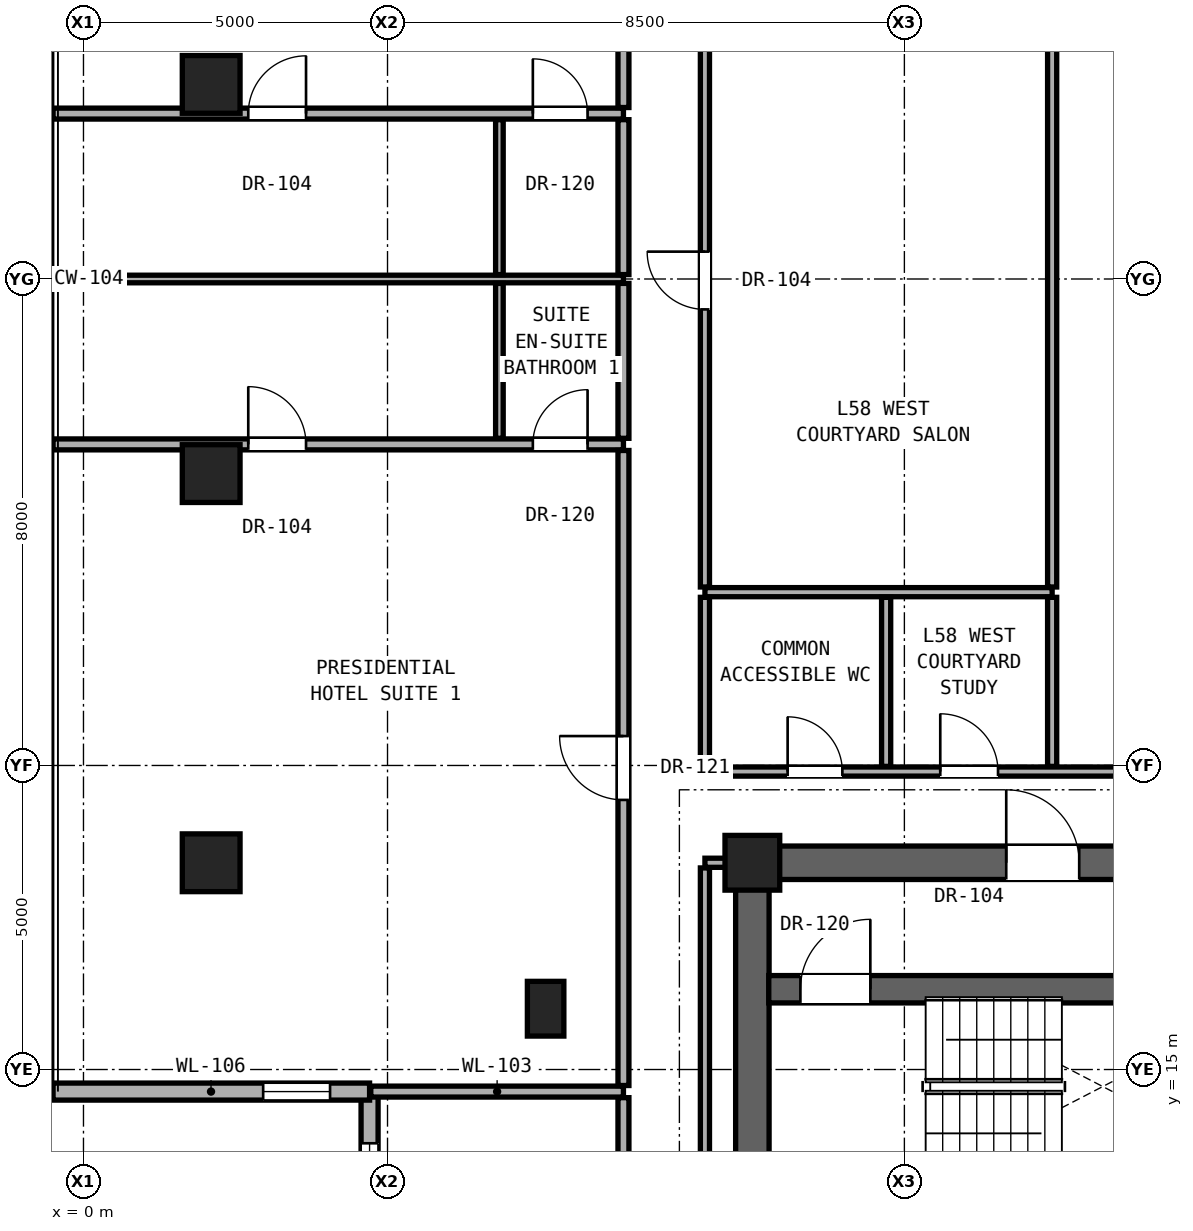
"""IFC4 building model, lengths in metres.
Left out: names, types, materials, properties, quantities, classifications, styles, units other than length and angle.
Written with IfcOpenShell. Run it as: python <this file> out.ifc"""

import sys

from ifc_helpers import new_model, si_unit, direction, frame, frame_2d, origin, origin_2d, place, context, subcontext, project, spatial, rectangle, hollow_rectangle, extrude, element, fill, save


model = new_model("IFC4")
c1 = context("Model", 3, precision=1e-05, world=origin(), true_north=direction((0.0, 1.0)))
c2 = subcontext(c1, "Body", "Model", "MODEL_VIEW")
j1 = project(units=[si_unit("LENGTHUNIT", "METRE"), si_unit("PLANEANGLEUNIT", "RADIAN")], contexts=[c1])
p1 = place(None, origin())
s1 = spatial("IfcSite", under=j1, at=p1, CompositionType="ELEMENT")
p2 = place(p1, origin())
s2 = spatial("IfcBuilding", under=s1, at=p2, CompositionType="ELEMENT")
p3 = place(p2, frame((0.0, 0.0, 203.15)))
s3 = spatial("IfcBuildingStorey", under=s2, at=p3, CompositionType="ELEMENT", Elevation=203.15)
p4 = place(p3, frame((11.0, 18.4, 0.0), z_axis=(0.0, 0.0, 1.0), x_axis=(1.0, 0.0, 0.0)))
e1 = element("IfcColumn", 1, at=p4, inside=s3, PredefinedType="COLUMN", context=c2, shape_type="SweptSolid", body=[
    extrude(rectangle(XDim=0.9, YDim=0.9, at=origin_2d()), origin(), (0.0, 0.0, 1.0), 3.25),
])
for number, where, z_axis, x_axis in (
    (2, (2.1, 18.4, 0.0), (0.0, 0.0, 1.0), (1.0, 0.0, 0.0)),
    (3, (2.1, 24.8, 0.0), (0.0, 0.0, 1.0), (1.0, 0.0, 0.0)),
    (4, (2.1, 31.2, 0.0), (0.0, 0.0, 1.0), (1.0, 0.0, 0.0)),
):
    element("IfcColumn", number, at=place(p3, frame(where, z_axis=z_axis, x_axis=x_axis)), inside=s3, PredefinedType="COLUMN", context=c2, shape_type="SweptSolid", body=[
        extrude(hollow_rectangle(XDim=0.95, YDim=0.95, WallThickness=0.05, at=origin_2d()), origin(), (0.0, 0.0, 1.0), 3.25),
    ])
p5 = place(p3, frame((7.6, 16.0, 0.0), z_axis=(0.0, 0.0, 1.0), x_axis=(1.0, 0.0, 0.0)))
e5 = element("IfcColumn", 5, at=p5, inside=s3, PredefinedType="PILASTER", context=c2, shape_type="SweptSolid", body=[
    extrude(rectangle(XDim=0.6, YDim=0.9, at=origin_2d()), origin(), (0.0, 0.0, 1.0), 3.25),
])
p6 = place(p3, frame((11.0, 12.4, 0.0), z_axis=(0.0, 0.0, 1.0), x_axis=(0.0, 1.0, 0.0)))
e6 = element("IfcWall", 6, at=p6, inside=s3, PredefinedType="SHEAR", context=c2, shape_type="SweptSolid", body=[
    extrude(rectangle(XDim=6.0, YDim=0.55, at=frame_2d((3.0, 0.0))), origin(), (0.0, 0.0, 1.0), 3.05),
])
p7 = place(p3, frame((11.0, 18.4, 0.0), z_axis=(0.0, 0.0, 1.0), x_axis=(1.0, 0.0, 0.0)))
e7 = element("IfcWall", 7, at=p7, inside=s3, PredefinedType="SHEAR", context=c2, shape_type="SweptSolid", body=[
    extrude(rectangle(XDim=19.0, YDim=0.55, at=frame_2d((9.5, 0.0))), origin(), (0.0, 0.0, 1.0), 3.05),
])
p8 = place(p7, frame((4.175, 0.0, 0.0)))
e8 = element("IfcOpeningElement", 8, at=p8, cuts=e7, PredefinedType="OPENING", context=c2, shape_type="SweptSolid", body=[
    extrude(rectangle(XDim=1.2, YDim=2.25, at=frame_2d((0.6, 1.125))), frame((0.0, 0.285, 0.0), z_axis=(0.0, -1.0, 0.0), x_axis=(1.0, 0.0, 0.0)), (0.0, 0.0, 1.0), 0.57),
])
p9 = place(p7, frame((11.075, 0.0, 0.0)))
e9 = element("IfcOpeningElement", 9, at=p9, cuts=e7, PredefinedType="OPENING", context=c2, shape_type="SweptSolid", body=[
    extrude(rectangle(XDim=0.95, YDim=2.15, at=frame_2d((0.475, 1.075))), frame((0.0, 0.285, 0.0), z_axis=(0.0, -1.0, 0.0), x_axis=(1.0, 0.0, 0.0)), (0.0, 0.0, 1.0), 0.57),
])
p10 = place(p7, frame((14.3, 0.0, 0.0)))
e10 = element("IfcOpeningElement", 10, at=p10, cuts=e7, PredefinedType="OPENING", context=c2, shape_type="SweptSolid", body=[
    extrude(rectangle(XDim=1.3, YDim=2.3, at=frame_2d((0.65, 1.15))), frame((0.0, 0.285, 0.0), z_axis=(0.0, -1.0, 0.0), x_axis=(1.0, 0.0, 0.0)), (0.0, 0.0, 1.0), 0.57),
])
p11 = place(p7, frame((16.6, 0.0, 0.0)))
e11 = element("IfcOpeningElement", 11, at=p11, cuts=e7, PredefinedType="OPENING", context=c2, shape_type="SweptSolid", body=[
    extrude(rectangle(XDim=1.3, YDim=2.3, at=frame_2d((0.65, 1.15))), frame((0.0, 0.285, 0.0), z_axis=(0.0, -1.0, 0.0), x_axis=(1.0, 0.0, 0.0)), (0.0, 0.0, 1.0), 0.57),
])
p12 = place(p3, frame((4.705, 14.637, 0.0), z_axis=(0.0, 0.0, 1.0), x_axis=(0.0, -1.0, 0.0)))
e12 = element("IfcWall", 12, at=p12, inside=s3, PredefinedType="SOLIDWALL", context=c2, shape_type="SweptSolid", body=[
    extrude(rectangle(XDim=5.215, YDim=0.28, at=frame_2d((2.607, 0.0))), origin(), (0.0, 0.0, 1.0), 3.03),
])
p13 = place(p12, frame((0.85, 0.0, 0.68)))
e13 = element("IfcOpeningElement", 13, at=p13, cuts=e12, PredefinedType="OPENING", context=c2, shape_type="SweptSolid", body=[
    extrude(rectangle(XDim=1.35, YDim=2.2, at=frame_2d((0.675, 1.1))), frame((0.0, 0.15, 0.0), z_axis=(0.0, -1.0, 0.0), x_axis=(1.0, 0.0, 0.0)), (0.0, 0.0, 1.0), 0.3),
])
p14 = place(p3, frame((-0.51, 14.637, 0.0), z_axis=(0.0, 0.0, 1.0), x_axis=(1.0, 0.0, 0.0)))
e14 = element("IfcWall", 14, at=p14, inside=s3, PredefinedType="SOLIDWALL", context=c2, shape_type="SweptSolid", body=[
    extrude(rectangle(XDim=5.215, YDim=0.28, at=frame_2d((2.607, 0.0))), origin(), (0.0, 0.0, 1.0), 3.03),
])
p15 = place(p14, frame((3.465, 0.0, 0.85)))
e15 = element("IfcOpeningElement", 15, at=p15, cuts=e14, PredefinedType="OPENING", context=c2, shape_type="SweptSolid", body=[
    extrude(rectangle(XDim=1.1, YDim=2.0, at=frame_2d((0.55, 1.0))), frame((0.0, 0.15, 0.0), z_axis=(0.0, -1.0, 0.0), x_axis=(1.0, 0.0, 0.0)), (0.0, 0.0, 1.0), 0.3),
])
p16 = place(p3, frame((4.725, 14.637, 0.0), z_axis=(0.0, 0.0, 1.0), x_axis=(1.0, 0.0, 0.0)))
e16 = element("IfcWall", 16, at=p16, inside=s3, PredefinedType="PARTITIONING", context=c2, shape_type="SweptSolid", body=[
    extrude(rectangle(XDim=4.155, YDim=0.18, at=frame_2d((2.077, 0.0))), origin(), (0.0, 0.0, 1.0), 3.05),
])
p17 = place(p3, frame((11.27, 16.32, 0.0), z_axis=(0.0, 0.0, 1.0), x_axis=(1.0, 0.0, 0.0)))
e17 = element("IfcWall", 17, at=p17, inside=s3, PredefinedType="SHEAR", context=c2, shape_type="SweptSolid", body=[
    extrude(rectangle(XDim=9.01, YDim=0.45, at=frame_2d((4.505, 0.0))), origin(), (0.0, 0.0, 1.0), 3.05),
])
p18 = place(p17, frame((0.52, 0.0, 0.0)))
e18 = element("IfcOpeningElement", 18, at=p18, cuts=e17, PredefinedType="OPENING", context=c2, shape_type="SweptSolid", body=[
    extrude(rectangle(XDim=1.15, YDim=2.2, at=frame_2d((0.575, 1.1))), frame((0.0, 0.235, 0.0), z_axis=(0.0, -1.0, 0.0), x_axis=(1.0, 0.0, 0.0)), (0.0, 0.0, 1.0), 0.47),
])
p19 = place(p3, frame((10.22, 18.4, 0.0), z_axis=(0.0, 0.0, 1.0), x_axis=(1.0, 0.0, 0.0)))
e19 = element("IfcWall", 19, at=p19, inside=s3, PredefinedType="PARTITIONING", context=c2, shape_type="SweptSolid", body=[
    extrude(rectangle(XDim=0.51, YDim=0.15, at=frame_2d((0.255, 0.0))), origin(), (0.0, 0.0, 1.0), 2.442),
])
p20 = place(p3, frame((10.22, 19.9, 0.0), z_axis=(0.0, 0.0, 1.0), x_axis=(1.0, 0.0, 0.0)))
e20 = element("IfcWall", 20, at=p20, inside=s3, PredefinedType="PARTITIONING", context=c2, shape_type="SweptSolid", body=[
    extrude(rectangle(XDim=20.56, YDim=0.15, at=frame_2d((10.28, 0.0))), origin(), (0.0, 0.0, 1.0), 2.186),
])
p21 = place(p20, frame((1.36, 0.0, 0.0)))
e21 = element("IfcOpeningElement", 21, at=p21, cuts=e20, PredefinedType="OPENING", context=c2, shape_type="SweptSolid", body=[
    extrude(rectangle(XDim=0.9, YDim=2.1, at=frame_2d((0.45, 1.05))), frame((0.0, 0.085, 0.0), z_axis=(0.0, -1.0, 0.0), x_axis=(1.0, 0.0, 0.0)), (0.0, 0.0, 1.0), 0.17),
])
p22 = place(p20, frame((3.87, 0.0, 0.0)))
e22 = element("IfcOpeningElement", 22, at=p22, cuts=e20, PredefinedType="OPENING", context=c2, shape_type="SweptSolid", body=[
    extrude(rectangle(XDim=0.95, YDim=2.15, at=frame_2d((0.475, 1.075))), frame((0.0, 0.085, 0.0), z_axis=(0.0, -1.0, 0.0), x_axis=(1.0, 0.0, 0.0)), (0.0, 0.0, 1.0), 0.17),
])
p23 = place(p20, frame((7.661, 0.0, 0.0)))
e23 = element("IfcOpeningElement", 23, at=p23, cuts=e20, PredefinedType="OPENING", context=c2, shape_type="SweptSolid", body=[
    extrude(rectangle(XDim=0.85, YDim=2.01, at=frame_2d((0.425, 1.005))), frame((0.0, 0.085, 0.0), z_axis=(0.0, -1.0, 0.0), x_axis=(1.0, 0.0, 0.0)), (0.0, 0.0, 1.0), 0.17),
])
p24 = place(p3, frame((10.22, 22.85, 0.0), z_axis=(0.0, 0.0, 1.0), x_axis=(1.0, 0.0, 0.0)))
e24 = element("IfcWall", 24, at=p24, inside=s3, PredefinedType="PARTITIONING", context=c2, shape_type="SweptSolid", body=[
    extrude(rectangle(XDim=5.71, YDim=0.15, at=frame_2d((2.855, 0.0))), origin(), (0.0, 0.0, 1.0), 2.186),
])
p25 = place(p3, frame((-0.51, 25.28, 0.0), z_axis=(0.0, 0.0, 1.0), x_axis=(1.0, 0.0, 0.0)))
e25 = element("IfcWall", 25, at=p25, inside=s3, PredefinedType="PARTITIONING", context=c2, shape_type="SweptSolid", body=[
    extrude(rectangle(XDim=9.39, YDim=0.18, at=frame_2d((4.695, 0.0))), origin(), (0.0, 0.0, 1.0), 2.269),
])
p26 = place(p25, frame((3.22, 0.0, 0.0)))
e26 = element("IfcOpeningElement", 26, at=p26, cuts=e25, PredefinedType="OPENING", context=c2, shape_type="SweptSolid", body=[
    extrude(rectangle(XDim=0.95, YDim=2.15, at=frame_2d((0.475, 1.075))), frame((0.0, 0.1, 0.0), z_axis=(0.0, -1.0, 0.0), x_axis=(1.0, 0.0, 0.0)), (0.0, 0.0, 1.0), 0.2),
])
p27 = place(p25, frame((7.9, 0.0, 0.0)))
e27 = element("IfcOpeningElement", 27, at=p27, cuts=e25, PredefinedType="OPENING", context=c2, shape_type="SweptSolid", body=[
    extrude(rectangle(XDim=0.9, YDim=2.1, at=frame_2d((0.45, 1.05))), frame((0.0, 0.1, 0.0), z_axis=(0.0, -1.0, 0.0), x_axis=(1.0, 0.0, 0.0)), (0.0, 0.0, 1.0), 0.2),
])
p28 = place(p3, frame((-0.51, 28.0, 0.0), z_axis=(0.0, 0.0, 1.0), x_axis=(1.0, 0.0, 0.0)))
e28 = element("IfcWall", 28, at=p28, inside=s3, PredefinedType="PARTITIONING", context=c2, shape_type="SweptSolid", body=[
    extrude(rectangle(XDim=9.39, YDim=0.125, at=frame_2d((4.695, 0.0))), origin(), (0.0, 0.0, 1.0), 2.269),
])
p29 = place(p3, frame((-0.51, 30.72, 0.0), z_axis=(0.0, 0.0, 1.0), x_axis=(1.0, 0.0, 0.0)))
e29 = element("IfcWall", 29, at=p29, inside=s3, PredefinedType="PARTITIONING", context=c2, shape_type="SweptSolid", body=[
    extrude(rectangle(XDim=9.39, YDim=0.18, at=frame_2d((4.695, 0.0))), origin(), (0.0, 0.0, 1.0), 2.269),
])
p30 = place(p29, frame((3.22, 0.0, 0.0)))
e30 = element("IfcOpeningElement", 30, at=p30, cuts=e29, PredefinedType="OPENING", context=c2, shape_type="SweptSolid", body=[
    extrude(rectangle(XDim=0.95, YDim=2.15, at=frame_2d((0.475, 1.075))), frame((0.0, 0.1, 0.0), z_axis=(0.0, -1.0, 0.0), x_axis=(1.0, 0.0, 0.0)), (0.0, 0.0, 1.0), 0.2),
])
p31 = place(p29, frame((7.9, 0.0, 0.0)))
e31 = element("IfcOpeningElement", 31, at=p31, cuts=e29, PredefinedType="OPENING", context=c2, shape_type="SweptSolid", body=[
    extrude(rectangle(XDim=0.9, YDim=2.1, at=frame_2d((0.45, 1.05))), frame((0.0, 0.1, 0.0), z_axis=(0.0, -1.0, 0.0), x_axis=(1.0, 0.0, 0.0)), (0.0, 0.0, 1.0), 0.2),
])
for number, where, z_axis, x_axis in (
    (32, (6.84, 25.38, 0.0), (0.0, 0.0, 1.0), (0.0, 1.0, 0.0)),
    (33, (6.84, 28.073, 0.0), (0.0, 0.0, 1.0), (0.0, 1.0, 0.0)),
):
    element("IfcWall", number, at=place(p3, frame(where, z_axis=z_axis, x_axis=x_axis)), inside=s3, PredefinedType="PARTITIONING", context=c2, shape_type="SweptSolid", body=[
        extrude(rectangle(XDim=2.548, YDim=0.125, at=frame_2d((1.274, 0.0))), origin(), (0.0, 0.0, 1.0), 3.05),
    ])
p32 = place(p3, frame((8.88, 9.422, 0.0), z_axis=(0.0, 0.0, 1.0), x_axis=(0.0, 1.0, 0.0)))
e34 = element("IfcWall", 34, at=p32, inside=s3, PredefinedType="PARTITIONING", context=c2, shape_type="SweptSolid", body=[
    extrude(rectangle(XDim=5.115, YDim=0.18, at=frame_2d((2.558, 0.0))), origin(), (0.0, 0.0, 1.0), 3.05),
])
p33 = place(p32, frame((2.083, 0.0, 0.0)))
e35 = element("IfcOpeningElement", 35, at=p33, cuts=e34, PredefinedType="OPENING", context=c2, shape_type="SweptSolid", body=[
    extrude(rectangle(XDim=0.95, YDim=2.15, at=frame_2d((0.475, 1.075))), frame((0.0, 0.1, 0.0), z_axis=(0.0, -1.0, 0.0), x_axis=(1.0, 0.0, 0.0)), (0.0, 0.0, 1.0), 0.2),
])
p34 = place(p3, frame((8.88, 14.737, 0.0), z_axis=(0.0, 0.0, 1.0), x_axis=(0.0, 1.0, 0.0)))
e36 = element("IfcWall", 36, at=p34, inside=s3, PredefinedType="PARTITIONING", context=c2, shape_type="SweptSolid", body=[
    extrude(rectangle(XDim=10.443, YDim=0.18, at=frame_2d((5.221, 0.0))), origin(), (0.0, 0.0, 1.0), 2.346),
])
p35 = place(p34, frame((4.697, 0.0, 0.0)))
e37 = element("IfcOpeningElement", 37, at=p35, cuts=e36, PredefinedType="OPENING", context=c2, shape_type="SweptSolid", body=[
    extrude(rectangle(XDim=1.05, YDim=2.2, at=frame_2d((0.525, 1.1))), frame((0.0, 0.1, 0.0), z_axis=(0.0, -1.0, 0.0), x_axis=(1.0, 0.0, 0.0)), (0.0, 0.0, 1.0), 0.2),
])
for number, where, z_axis, x_axis in (
    (38, (8.88, 25.38, 0.0), (0.0, 0.0, 1.0), (0.0, 1.0, 0.0)),
    (39, (8.88, 28.073, 0.0), (0.0, 0.0, 1.0), (0.0, 1.0, 0.0)),
):
    element("IfcWall", number, at=place(p3, frame(where, z_axis=z_axis, x_axis=x_axis)), inside=s3, PredefinedType="PARTITIONING", context=c2, shape_type="SweptSolid", body=[
        extrude(rectangle(XDim=2.548, YDim=0.18, at=frame_2d((1.274, 0.0))), origin(), (0.0, 0.0, 1.0), 3.05),
    ])
p36 = place(p3, frame((8.88, 30.82, 0.0), z_axis=(0.0, 0.0, 1.0), x_axis=(0.0, 1.0, 0.0)))
e40 = element("IfcWall", 40, at=p36, inside=s3, PredefinedType="PARTITIONING", context=c2, shape_type="SweptSolid", body=[
    extrude(rectangle(XDim=10.443, YDim=0.18, at=frame_2d((5.221, 0.0))), origin(), (0.0, 0.0, 1.0), 2.346),
])
p37 = place(p36, frame((4.697, 0.0, 0.0)))
e41 = element("IfcOpeningElement", 41, at=p37, cuts=e40, PredefinedType="OPENING", context=c2, shape_type="SweptSolid", body=[
    extrude(rectangle(XDim=1.05, YDim=2.2, at=frame_2d((0.525, 1.1))), frame((0.0, 0.1, 0.0), z_axis=(0.0, -1.0, 0.0), x_axis=(1.0, 0.0, 0.0)), (0.0, 0.0, 1.0), 0.2),
])
p38 = place(p3, frame((10.22, 12.335, 0.0), z_axis=(0.0, 0.0, 1.0), x_axis=(0.0, 1.0, 0.0)))
e42 = element("IfcWall", 42, at=p38, inside=s3, PredefinedType="PARTITIONING", context=c2, shape_type="SweptSolid", body=[
    extrude(rectangle(XDim=5.98, YDim=0.15, at=frame_2d((2.99, 0.0))), origin(), (0.0, 0.0, 1.0), 2.442),
])
p39 = place(p3, frame((10.22, 19.985, 0.0), z_axis=(0.0, 0.0, 1.0), x_axis=(0.0, 1.0, 0.0)))
e43 = element("IfcWall", 43, at=p39, inside=s3, PredefinedType="PARTITIONING", context=c2, shape_type="SweptSolid", body=[
    extrude(rectangle(XDim=2.78, YDim=0.15, at=frame_2d((1.39, 0.0))), origin(), (0.0, 0.0, 1.0), 3.05),
])
p40 = place(p3, frame((10.22, 22.935, 0.0), z_axis=(0.0, 0.0, 1.0), x_axis=(0.0, 1.0, 0.0)))
e44 = element("IfcWall", 44, at=p40, inside=s3, PredefinedType="PARTITIONING", context=c2, shape_type="SweptSolid", body=[
    extrude(rectangle(XDim=10.08, YDim=0.15, at=frame_2d((5.04, 0.0))), origin(), (0.0, 0.0, 1.0), 2.346),
])
p41 = place(p40, frame((4.565, 0.0, 0.0)))
e45 = element("IfcOpeningElement", 45, at=p41, cuts=e44, PredefinedType="OPENING", context=c2, shape_type="SweptSolid", body=[
    extrude(rectangle(XDim=0.95, YDim=2.15, at=frame_2d((0.475, 1.075))), frame((0.0, 0.085, 0.0), z_axis=(0.0, -1.0, 0.0), x_axis=(1.0, 0.0, 0.0)), (0.0, 0.0, 1.0), 0.17),
])
for number, where, z_axis, x_axis in (
    (46, (13.2, 19.985, 0.0), (0.0, 0.0, 1.0), (0.0, 1.0, 0.0)),
    (47, (15.93, 19.985, 0.0), (0.0, 0.0, 1.0), (0.0, 1.0, 0.0)),
):
    element("IfcWall", number, at=place(p3, frame(where, z_axis=z_axis, x_axis=x_axis)), inside=s3, PredefinedType="PARTITIONING", context=c2, shape_type="SweptSolid", body=[
        extrude(rectangle(XDim=2.78, YDim=0.15, at=frame_2d((1.39, 0.0))), origin(), (0.0, 0.0, 1.0), 3.05),
    ])
p42 = place(p3, frame((15.93, 22.935, 0.0), z_axis=(0.0, 0.0, 1.0), x_axis=(0.0, 1.0, 0.0)))
e48 = element("IfcWall", 48, at=p42, inside=s3, PredefinedType="PARTITIONING", context=c2, shape_type="SweptSolid", body=[
    extrude(rectangle(XDim=10.08, YDim=0.15, at=frame_2d((5.04, 0.0))), origin(), (0.0, 0.0, 1.0), 2.186),
])
p43 = place(p13, origin())
e49 = element("IfcWindow", 49, at=p43, inside=s3, PartitioningType="SINGLE_PANEL", PredefinedType="WINDOW", context=c2, shape_type="SweptSolid", body=[
    extrude(rectangle(XDim=1.35, YDim=2.2, at=frame_2d((0.675, 1.1))), frame((0.0, 0.03, 0.0), z_axis=(0.0, -1.0, 0.0), x_axis=(1.0, 0.0, 0.0)), (0.0, 0.0, 1.0), 0.06),
])
fill(e13, e49)
p44 = place(p15, origin())
e50 = element("IfcWindow", 50, at=p44, inside=s3, PartitioningType="SINGLE_PANEL", PredefinedType="WINDOW", context=c2, shape_type="SweptSolid", body=[
    extrude(rectangle(XDim=1.1, YDim=2.0, at=frame_2d((0.55, 1.0))), frame((0.0, 0.03, 0.0), z_axis=(0.0, -1.0, 0.0), x_axis=(1.0, 0.0, 0.0)), (0.0, 0.0, 1.0), 0.06),
])
fill(e15, e50)
p45 = place(p8, origin())
e51 = element("IfcDoor", 51, at=p45, inside=s3, OperationType="SINGLE_SWING_LEFT", PredefinedType="DOOR", context=c2, shape_type="SweptSolid", body=[
    extrude(rectangle(XDim=1.2, YDim=2.25, at=frame_2d((0.6, 1.125))), frame((0.0, 0.025, 0.0), z_axis=(0.0, -1.0, 0.0), x_axis=(1.0, 0.0, 0.0)), (0.0, 0.0, 1.0), 0.05),
])
fill(e8, e51)
p46 = place(p18, origin())
e52 = element("IfcDoor", 52, at=p46, inside=s3, OperationType="SINGLE_SWING_RIGHT", PredefinedType="DOOR", context=c2, shape_type="SweptSolid", body=[
    extrude(rectangle(XDim=1.15, YDim=2.2, at=frame_2d((0.575, 1.1))), frame((0.0, 0.025, 0.0), z_axis=(0.0, -1.0, 0.0), x_axis=(1.0, 0.0, 0.0)), (0.0, 0.0, 1.0), 0.05),
])
fill(e18, e52)
p47 = place(p21, origin())
e53 = element("IfcDoor", 53, at=p47, inside=s3, OperationType="SINGLE_SWING_LEFT", PredefinedType="DOOR", context=c2, shape_type="SweptSolid", body=[
    extrude(rectangle(XDim=0.9, YDim=2.1, at=frame_2d((0.45, 1.05))), frame((0.0, 0.025, 0.0), z_axis=(0.0, -1.0, 0.0), x_axis=(1.0, 0.0, 0.0)), (0.0, 0.0, 1.0), 0.05),
])
fill(e21, e53)
p48 = place(p35, origin())
e54 = element("IfcDoor", 54, at=p48, inside=s3, OperationType="SINGLE_SWING_RIGHT", PredefinedType="DOOR", context=c2, shape_type="SweptSolid", body=[
    extrude(rectangle(XDim=1.05, YDim=2.2, at=frame_2d((0.525, 1.1))), frame((0.0, 0.025, 0.0), z_axis=(0.0, -1.0, 0.0), x_axis=(1.0, 0.0, 0.0)), (0.0, 0.0, 1.0), 0.05),
])
fill(e37, e54)
p49 = place(p26, origin())
e55 = element("IfcDoor", 55, at=p49, inside=s3, OperationType="SINGLE_SWING_LEFT", PredefinedType="DOOR", context=c2, shape_type="SweptSolid", body=[
    extrude(rectangle(XDim=0.95, YDim=2.15, at=frame_2d((0.475, 1.075))), frame((0.0, 0.025, 0.0), z_axis=(0.0, -1.0, 0.0), x_axis=(1.0, 0.0, 0.0)), (0.0, 0.0, 1.0), 0.05),
])
fill(e26, e55)
p50 = place(p27, origin())
e56 = element("IfcDoor", 56, at=p50, inside=s3, OperationType="SINGLE_SWING_RIGHT", PredefinedType="DOOR", context=c2, shape_type="SweptSolid", body=[
    extrude(rectangle(XDim=0.9, YDim=2.1, at=frame_2d((0.45, 1.05))), frame((0.0, 0.025, 0.0), z_axis=(0.0, -1.0, 0.0), x_axis=(1.0, 0.0, 0.0)), (0.0, 0.0, 1.0), 0.05),
])
fill(e27, e56)
p51 = place(p30, origin())
e57 = element("IfcDoor", 57, at=p51, inside=s3, OperationType="SINGLE_SWING_RIGHT", PredefinedType="DOOR", context=c2, shape_type="SweptSolid", body=[
    extrude(rectangle(XDim=0.95, YDim=2.15, at=frame_2d((0.475, 1.075))), frame((0.0, 0.025, 0.0), z_axis=(0.0, -1.0, 0.0), x_axis=(1.0, 0.0, 0.0)), (0.0, 0.0, 1.0), 0.05),
])
fill(e30, e57)
p52 = place(p31, origin())
e58 = element("IfcDoor", 58, at=p52, inside=s3, OperationType="SINGLE_SWING_LEFT", PredefinedType="DOOR", context=c2, shape_type="SweptSolid", body=[
    extrude(rectangle(XDim=0.9, YDim=2.1, at=frame_2d((0.45, 1.05))), frame((0.0, 0.025, 0.0), z_axis=(0.0, -1.0, 0.0), x_axis=(1.0, 0.0, 0.0)), (0.0, 0.0, 1.0), 0.05),
])
fill(e31, e58)
p53 = place(p22, origin())
e59 = element("IfcDoor", 59, at=p53, inside=s3, OperationType="SINGLE_SWING_LEFT", PredefinedType="DOOR", context=c2, shape_type="SweptSolid", body=[
    extrude(rectangle(XDim=0.95, YDim=2.15, at=frame_2d((0.475, 1.075))), frame((0.0, 0.025, 0.0), z_axis=(0.0, -1.0, 0.0), x_axis=(1.0, 0.0, 0.0)), (0.0, 0.0, 1.0), 0.05),
])
fill(e22, e59)
p54 = place(p41, origin())
e60 = element("IfcDoor", 60, at=p54, inside=s3, OperationType="SINGLE_SWING_RIGHT", PredefinedType="DOOR", context=c2, shape_type="SweptSolid", body=[
    extrude(rectangle(XDim=0.95, YDim=2.15, at=frame_2d((0.475, 1.075))), frame((0.0, 0.025, 0.0), z_axis=(0.0, -1.0, 0.0), x_axis=(1.0, 0.0, 0.0)), (0.0, 0.0, 1.0), 0.05),
])
fill(e45, e60)
save(model, sys.argv[1])
